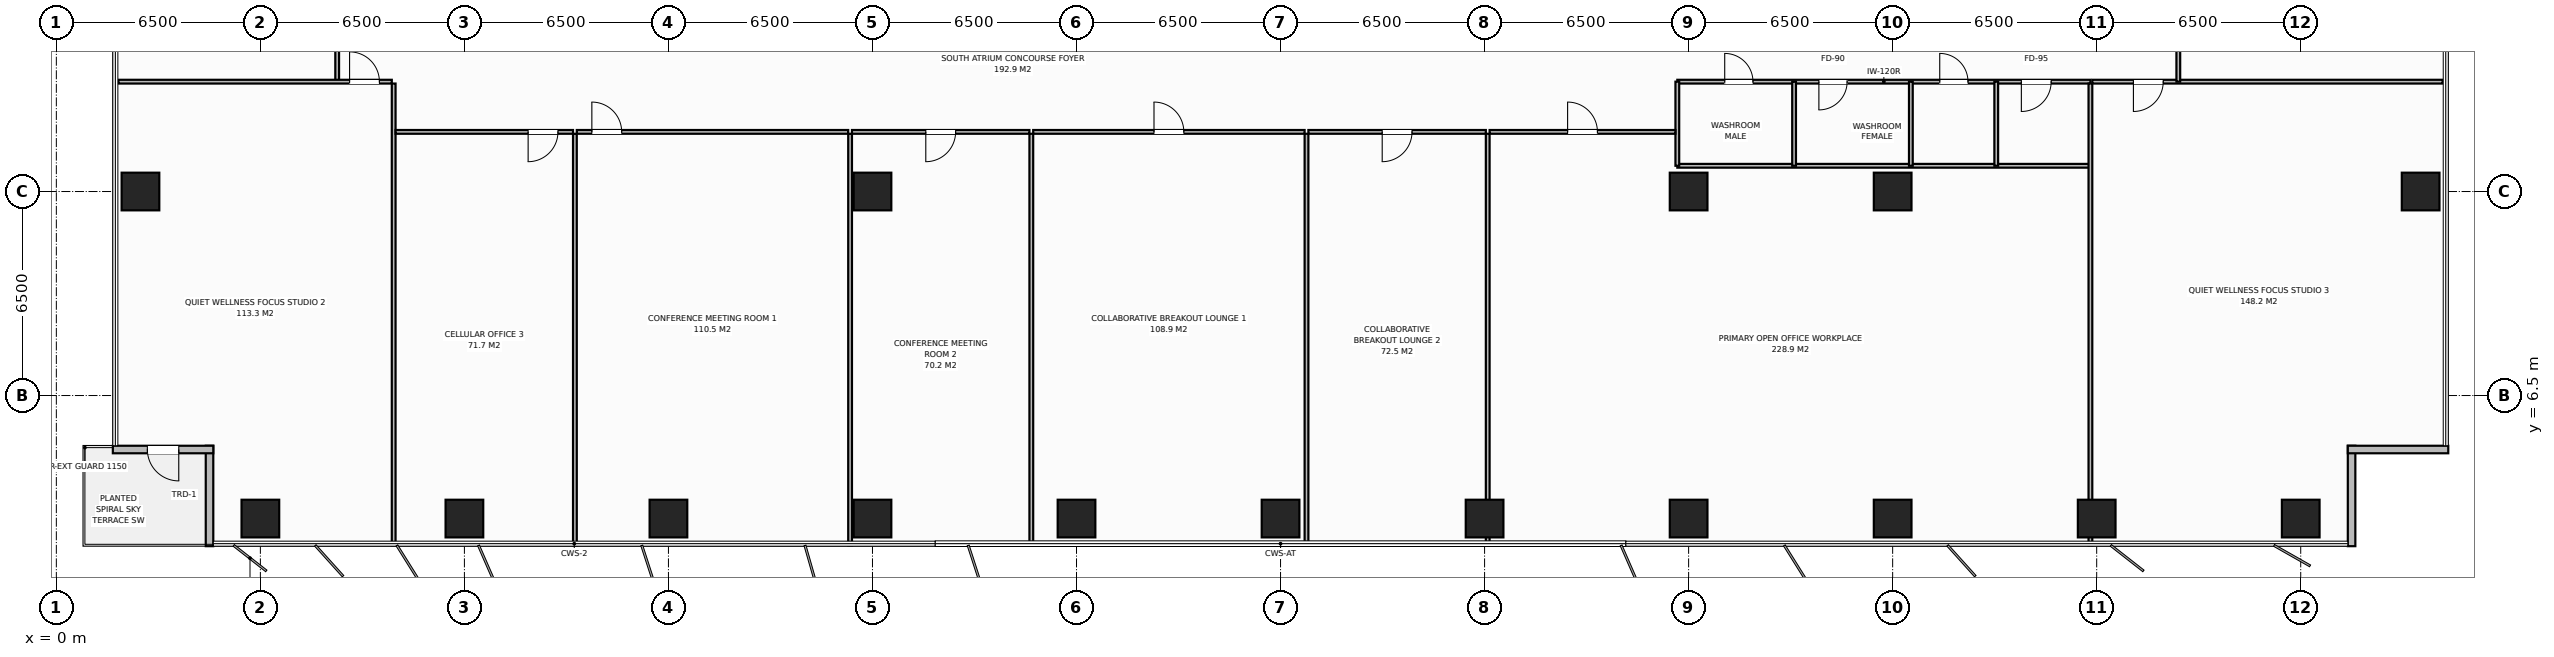
"""IFC4 building model, lengths in metres.
Left out: names, types, materials, properties, quantities, classifications, styles, units other than length and angle.
Written with IfcOpenShell. Run it as: python <this file> out.ifc"""

import sys

from ifc_helpers import new_model, si_unit, direction, frame, frame_2d, origin, origin_2d, place, context, subcontext, project, spatial, rectangle, extrude, element, fill, save


model = new_model("IFC4")
c1 = context("Model", 3, precision=1e-05, world=origin(), true_north=direction((0.0, 1.0)))
c2 = subcontext(c1, "Body", "Model", "MODEL_VIEW")
j1 = project(units=[si_unit("LENGTHUNIT", "METRE"), si_unit("PLANEANGLEUNIT", "RADIAN")], contexts=[c1])
p1 = place(None, origin())
s1 = spatial("IfcSite", under=j1, at=p1, CompositionType="ELEMENT")
p2 = place(p1, origin())
s2 = spatial("IfcBuilding", under=s1, at=p2, CompositionType="ELEMENT")
p3 = place(p2, frame((0.0, 0.0, 97.4)))
s3 = spatial("IfcBuildingStorey", under=s2, at=p3, CompositionType="ELEMENT", Elevation=97.4)
for number, where, z_axis, x_axis in (
    (1, (58.5, 13.0, 0.0), (0.0, 0.0, 1.0), (1.0, 0.0, 0.0)),
    (2, (26.0, 13.0, 0.0), (0.0, 0.0, 1.0), (1.0, 0.0, 0.0)),
    (3, (52.0, 13.0, 0.0), (0.0, 0.0, 1.0), (1.0, 0.0, 0.0)),
    (4, (6.5, 2.58, 0.0), (0.0, 0.0, 1.0), (1.0, 0.0, 0.0)),
    (5, (13.0, 2.58, 0.0), (0.0, 0.0, 1.0), (1.0, 0.0, 0.0)),
    (6, (19.5, 2.58, 0.0), (0.0, 0.0, 1.0), (1.0, 0.0, 0.0)),
    (7, (26.0, 2.58, 0.0), (0.0, 0.0, 1.0), (1.0, 0.0, 0.0)),
    (8, (32.5, 2.58, 0.0), (0.0, 0.0, 1.0), (1.0, 0.0, 0.0)),
    (9, (39.0, 2.58, 0.0), (0.0, 0.0, 1.0), (1.0, 0.0, 0.0)),
    (10, (45.5, 2.58, 0.0), (0.0, 0.0, 1.0), (1.0, 0.0, 0.0)),
    (11, (52.0, 2.58, 0.0), (0.0, 0.0, 1.0), (1.0, 0.0, 0.0)),
    (12, (58.5, 2.58, 0.0), (0.0, 0.0, 1.0), (1.0, 0.0, 0.0)),
    (13, (65.0, 2.58, 0.0), (0.0, 0.0, 1.0), (1.0, 0.0, 0.0)),
    (14, (71.5, 2.58, 0.0), (0.0, 0.0, 1.0), (1.0, 0.0, 0.0)),
    (15, (2.68, 13.0, 0.0), (0.0, 0.0, 1.0), (1.0, 0.0, 0.0)),
    (16, (75.32, 13.0, 0.0), (0.0, 0.0, 1.0), (1.0, 0.0, 0.0)),
):
    element("IfcColumn", number, at=place(p3, frame(where, z_axis=z_axis, x_axis=x_axis)), inside=s3, PredefinedType="COLUMN", context=c2, shape_type="SweptSolid", body=[
        extrude(rectangle(XDim=1.2, YDim=1.2, at=origin_2d()), origin(), (0.0, 0.0, 1.0), 3.8),
    ])
p4 = place(p3, frame((4.88, 1.7, 0.0), z_axis=(0.0, 0.0, 1.0), x_axis=(0.0, 1.0, 0.0)))
e17 = element("IfcWall", 17, at=p4, inside=s3, PredefinedType="STANDARD", context=c2, shape_type="SweptSolid", body=[
    extrude(rectangle(XDim=3.2, YDim=0.24, at=frame_2d((1.6, 0.0))), origin(), (0.0, 0.0, 1.0), 3.565),
])
p5 = place(p3, frame((5.0, 4.78, 0.0), z_axis=(0.0, 0.0, 1.0), x_axis=(-1.0, 0.0, 0.0)))
e18 = element("IfcWall", 18, at=p5, inside=s3, PredefinedType="STANDARD", context=c2, shape_type="SweptSolid", body=[
    extrude(rectangle(XDim=3.2, YDim=0.24, at=frame_2d((1.6, 0.0))), origin(), (0.0, 0.0, 1.0), 3.565),
])
p6 = place(p5, frame((1.1, 0.0, 0.0)))
e19 = element("IfcOpeningElement", 19, at=p6, cuts=e18, PredefinedType="OPENING", context=c2, shape_type="SweptSolid", body=[
    extrude(rectangle(XDim=1.0, YDim=2.2, at=frame_2d((0.5, 1.1))), frame((0.0, 0.13, 0.0), z_axis=(0.0, -1.0, 0.0), x_axis=(1.0, 0.0, 0.0)), (0.0, 0.0, 1.0), 0.26),
])
for number, where, z_axis, x_axis in (
    (20, (73.12, 4.9, 0.0), (0.0, 0.0, 1.0), (0.0, -1.0, 0.0)),
    (21, (76.2, 4.78, 0.0), (0.0, 0.0, 1.0), (-1.0, 0.0, 0.0)),
):
    element("IfcWall", number, at=place(p3, frame(where, z_axis=z_axis, x_axis=x_axis)), inside=s3, PredefinedType="STANDARD", context=c2, shape_type="SweptSolid", body=[
        extrude(rectangle(XDim=3.2, YDim=0.24, at=frame_2d((1.6, 0.0))), origin(), (0.0, 0.0, 1.0), 3.565),
    ])
p7 = place(p3, frame((8.947, 16.5, 0.0), z_axis=(0.0, 0.0, 1.0), x_axis=(0.0, 1.0, 0.0)))
e22 = element("IfcWall", 22, at=p7, inside=s3, PredefinedType="PARTITIONING", context=c2, shape_type="SweptSolid", body=[
    extrude(rectangle(XDim=2.1, YDim=0.12, at=frame_2d((1.05, 0.0))), origin(), (0.0, 0.0, 1.0), 3.565),
])
p8 = place(p3, frame((51.64, 16.5, 0.0), z_axis=(0.0, 0.0, 1.0), x_axis=(1.0, 0.0, 0.0)))
e23 = element("IfcWall", 23, at=p8, inside=s3, PredefinedType="PARTITIONING", context=c2, shape_type="SweptSolid", body=[
    extrude(rectangle(XDim=13.16, YDim=0.12, at=frame_2d((6.58, 0.0))), origin(), (0.0, 0.0, 1.0), 3.565),
])
p9 = place(p8, frame((1.51, 0.0, 0.0)))
e24 = element("IfcOpeningElement", 24, at=p9, cuts=e23, PredefinedType="OPENING", context=c2, shape_type="SweptSolid", body=[
    extrude(rectangle(XDim=0.9, YDim=2.15, at=frame_2d((0.45, 1.075))), frame((0.0, 0.07, 0.0), z_axis=(0.0, -1.0, 0.0), x_axis=(1.0, 0.0, 0.0)), (0.0, 0.0, 1.0), 0.14),
])
p10 = place(p8, frame((4.51, 0.0, 0.0)))
e25 = element("IfcOpeningElement", 25, at=p10, cuts=e23, PredefinedType="OPENING", context=c2, shape_type="SweptSolid", body=[
    extrude(rectangle(XDim=0.9, YDim=2.15, at=frame_2d((0.45, 1.075))), frame((0.0, 0.07, 0.0), z_axis=(0.0, -1.0, 0.0), x_axis=(1.0, 0.0, 0.0)), (0.0, 0.0, 1.0), 0.14),
])
p11 = place(p8, frame((8.36, 0.0, 0.0)))
e26 = element("IfcOpeningElement", 26, at=p11, cuts=e23, PredefinedType="OPENING", context=c2, shape_type="SweptSolid", body=[
    extrude(rectangle(XDim=0.9, YDim=2.15, at=frame_2d((0.45, 1.075))), frame((0.0, 0.07, 0.0), z_axis=(0.0, -1.0, 0.0), x_axis=(1.0, 0.0, 0.0)), (0.0, 0.0, 1.0), 0.14),
])
p12 = place(p8, frame((10.96, 0.0, 0.0)))
e27 = element("IfcOpeningElement", 27, at=p12, cuts=e23, PredefinedType="OPENING", context=c2, shape_type="SweptSolid", body=[
    extrude(rectangle(XDim=0.95, YDim=2.15, at=frame_2d((0.475, 1.075))), frame((0.0, 0.07, 0.0), z_axis=(0.0, -1.0, 0.0), x_axis=(1.0, 0.0, 0.0)), (0.0, 0.0, 1.0), 0.14),
])
p13 = place(p3, frame((51.64, 13.82, 0.0), z_axis=(0.0, 0.0, 1.0), x_axis=(1.0, 0.0, 0.0)))
e28 = element("IfcWall", 28, at=p13, inside=s3, PredefinedType="PARTITIONING", context=c2, shape_type="SweptSolid", body=[
    extrude(rectangle(XDim=13.16, YDim=0.12, at=frame_2d((6.58, 0.0))), origin(), (0.0, 0.0, 1.0), 3.565),
])
for number, where, z_axis, x_axis in (
    (29, (51.64, 13.82, 0.0), (0.0, 0.0, 1.0), (0.0, 1.0, 0.0)),
    (30, (55.36, 13.82, 0.0), (0.0, 0.0, 1.0), (0.0, 1.0, 0.0)),
    (31, (59.08, 13.82, 0.0), (0.0, 0.0, 1.0), (0.0, 1.0, 0.0)),
    (32, (61.8, 13.82, 0.0), (0.0, 0.0, 1.0), (0.0, 1.0, 0.0)),
):
    element("IfcWall", number, at=place(p3, frame(where, z_axis=z_axis, x_axis=x_axis)), inside=s3, PredefinedType="PARTITIONING", context=c2, shape_type="SweptSolid", body=[
        extrude(rectangle(XDim=2.68, YDim=0.12, at=frame_2d((1.34, 0.0))), origin(), (0.0, 0.0, 1.0), 3.565),
    ])
p14 = place(p3, frame((10.747, 1.72, 0.0), z_axis=(0.0, 0.0, 1.0), x_axis=(0.0, 1.0, 0.0)))
e33 = element("IfcWall", 33, at=p14, inside=s3, PredefinedType="PARTITIONING", context=c2, shape_type="SweptSolid", body=[
    extrude(rectangle(XDim=14.72, YDim=0.12, at=frame_2d((7.36, 0.0))), origin(), (0.0, 0.0, 1.0), 3.565),
])
p15 = place(p3, frame((1.98, 16.5, 0.0), z_axis=(0.0, 0.0, 1.0), x_axis=(1.0, 0.0, 0.0)))
e34 = element("IfcWall", 34, at=p15, inside=s3, PredefinedType="PARTITIONING", context=c2, shape_type="SweptSolid", body=[
    extrude(rectangle(XDim=8.707, YDim=0.12, at=frame_2d((4.354, 0.0))), origin(), (0.0, 0.0, 1.0), 3.565),
])
p16 = place(p15, frame((7.362, 0.0, 0.0)))
e35 = element("IfcOpeningElement", 35, at=p16, cuts=e34, PredefinedType="OPENING", context=c2, shape_type="SweptSolid", body=[
    extrude(rectangle(XDim=0.95, YDim=2.15, at=frame_2d((0.475, 1.075))), frame((0.0, 0.07, 0.0), z_axis=(0.0, -1.0, 0.0), x_axis=(1.0, 0.0, 0.0)), (0.0, 0.0, 1.0), 0.14),
])
p17 = place(p3, frame((16.52, 1.72, 0.0), z_axis=(0.0, 0.0, 1.0), x_axis=(0.0, 1.0, 0.0)))
e36 = element("IfcWall", 36, at=p17, inside=s3, PredefinedType="PARTITIONING", context=c2, shape_type="SweptSolid", body=[
    extrude(rectangle(XDim=13.12, YDim=0.12, at=frame_2d((6.56, 0.0))), origin(), (0.0, 0.0, 1.0), 3.565),
])
p18 = place(p3, frame((10.807, 14.9, 0.0), z_axis=(0.0, 0.0, 1.0), x_axis=(1.0, 0.0, 0.0)))
e37 = element("IfcWall", 37, at=p18, inside=s3, PredefinedType="PARTITIONING", context=c2, shape_type="SweptSolid", body=[
    extrude(rectangle(XDim=5.653, YDim=0.12, at=frame_2d((2.827, 0.0))), origin(), (0.0, 0.0, 1.0), 3.565),
])
p19 = place(p18, frame((4.223, 0.0, 0.0)))
e38 = element("IfcOpeningElement", 38, at=p19, cuts=e37, PredefinedType="OPENING", context=c2, shape_type="SweptSolid", body=[
    extrude(rectangle(XDim=0.95, YDim=2.15, at=frame_2d((0.475, 1.075))), frame((0.0, 0.07, 0.0), z_axis=(0.0, -1.0, 0.0), x_axis=(1.0, 0.0, 0.0)), (0.0, 0.0, 1.0), 0.14),
])
p20 = place(p3, frame((25.287, 1.72, 0.0), z_axis=(0.0, 0.0, 1.0), x_axis=(0.0, 1.0, 0.0)))
e39 = element("IfcWall", 39, at=p20, inside=s3, PredefinedType="PARTITIONING", context=c2, shape_type="SweptSolid", body=[
    extrude(rectangle(XDim=13.12, YDim=0.12, at=frame_2d((6.56, 0.0))), origin(), (0.0, 0.0, 1.0), 3.565),
])
p21 = place(p3, frame((16.58, 14.9, 0.0), z_axis=(0.0, 0.0, 1.0), x_axis=(1.0, 0.0, 0.0)))
e40 = element("IfcWall", 40, at=p21, inside=s3, PredefinedType="PARTITIONING", context=c2, shape_type="SweptSolid", body=[
    extrude(rectangle(XDim=8.647, YDim=0.12, at=frame_2d((4.323, 0.0))), origin(), (0.0, 0.0, 1.0), 3.565),
])
p22 = place(p21, frame((0.48, 0.0, 0.0)))
e41 = element("IfcOpeningElement", 41, at=p22, cuts=e40, PredefinedType="OPENING", context=c2, shape_type="SweptSolid", body=[
    extrude(rectangle(XDim=0.95, YDim=2.15, at=frame_2d((0.475, 1.075))), frame((0.0, 0.07, 0.0), z_axis=(0.0, -1.0, 0.0), x_axis=(1.0, 0.0, 0.0)), (0.0, 0.0, 1.0), 0.14),
])
p23 = place(p3, frame((31.06, 1.72, 0.0), z_axis=(0.0, 0.0, 1.0), x_axis=(0.0, 1.0, 0.0)))
e42 = element("IfcWall", 42, at=p23, inside=s3, PredefinedType="PARTITIONING", context=c2, shape_type="SweptSolid", body=[
    extrude(rectangle(XDim=13.12, YDim=0.12, at=frame_2d((6.56, 0.0))), origin(), (0.0, 0.0, 1.0), 3.565),
])
p24 = place(p3, frame((25.347, 14.9, 0.0), z_axis=(0.0, 0.0, 1.0), x_axis=(1.0, 0.0, 0.0)))
e43 = element("IfcWall", 43, at=p24, inside=s3, PredefinedType="PARTITIONING", context=c2, shape_type="SweptSolid", body=[
    extrude(rectangle(XDim=5.653, YDim=0.12, at=frame_2d((2.827, 0.0))), origin(), (0.0, 0.0, 1.0), 3.565),
])
p25 = place(p24, frame((2.352, 0.0, 0.0)))
e44 = element("IfcOpeningElement", 44, at=p25, cuts=e43, PredefinedType="OPENING", context=c2, shape_type="SweptSolid", body=[
    extrude(rectangle(XDim=0.95, YDim=2.15, at=frame_2d((0.475, 1.075))), frame((0.0, 0.07, 0.0), z_axis=(0.0, -1.0, 0.0), x_axis=(1.0, 0.0, 0.0)), (0.0, 0.0, 1.0), 0.14),
])
p26 = place(p3, frame((39.827, 1.72, 0.0), z_axis=(0.0, 0.0, 1.0), x_axis=(0.0, 1.0, 0.0)))
e45 = element("IfcWall", 45, at=p26, inside=s3, PredefinedType="PARTITIONING", context=c2, shape_type="SweptSolid", body=[
    extrude(rectangle(XDim=13.12, YDim=0.12, at=frame_2d((6.56, 0.0))), origin(), (0.0, 0.0, 1.0), 3.565),
])
p27 = place(p3, frame((31.12, 14.9, 0.0), z_axis=(0.0, 0.0, 1.0), x_axis=(1.0, 0.0, 0.0)))
e46 = element("IfcWall", 46, at=p27, inside=s3, PredefinedType="PARTITIONING", context=c2, shape_type="SweptSolid", body=[
    extrude(rectangle(XDim=8.647, YDim=0.12, at=frame_2d((4.323, 0.0))), origin(), (0.0, 0.0, 1.0), 3.565),
])
p28 = place(p27, frame((3.848, 0.0, 0.0)))
e47 = element("IfcOpeningElement", 47, at=p28, cuts=e46, PredefinedType="OPENING", context=c2, shape_type="SweptSolid", body=[
    extrude(rectangle(XDim=0.95, YDim=2.15, at=frame_2d((0.475, 1.075))), frame((0.0, 0.07, 0.0), z_axis=(0.0, -1.0, 0.0), x_axis=(1.0, 0.0, 0.0)), (0.0, 0.0, 1.0), 0.14),
])
p29 = place(p3, frame((45.6, 1.72, 0.0), z_axis=(0.0, 0.0, 1.0), x_axis=(0.0, 1.0, 0.0)))
e48 = element("IfcWall", 48, at=p29, inside=s3, PredefinedType="PARTITIONING", context=c2, shape_type="SweptSolid", body=[
    extrude(rectangle(XDim=13.12, YDim=0.12, at=frame_2d((6.56, 0.0))), origin(), (0.0, 0.0, 1.0), 2.965),
])
p30 = place(p3, frame((39.887, 14.9, 0.0), z_axis=(0.0, 0.0, 1.0), x_axis=(1.0, 0.0, 0.0)))
e49 = element("IfcWall", 49, at=p30, inside=s3, PredefinedType="PARTITIONING", context=c2, shape_type="SweptSolid", body=[
    extrude(rectangle(XDim=5.653, YDim=0.12, at=frame_2d((2.827, 0.0))), origin(), (0.0, 0.0, 1.0), 3.565),
])
p31 = place(p30, frame((2.352, 0.0, 0.0)))
e50 = element("IfcOpeningElement", 50, at=p31, cuts=e49, PredefinedType="OPENING", context=c2, shape_type="SweptSolid", body=[
    extrude(rectangle(XDim=0.95, YDim=2.15, at=frame_2d((0.475, 1.075))), frame((0.0, 0.07, 0.0), z_axis=(0.0, -1.0, 0.0), x_axis=(1.0, 0.0, 0.0)), (0.0, 0.0, 1.0), 0.14),
])
p32 = place(p3, frame((64.8, 1.72, 0.0), z_axis=(0.0, 0.0, 1.0), x_axis=(0.0, 1.0, 0.0)))
e51 = element("IfcWall", 51, at=p32, inside=s3, PredefinedType="PARTITIONING", context=c2, shape_type="SweptSolid", body=[
    extrude(rectangle(XDim=14.72, YDim=0.12, at=frame_2d((7.36, 0.0))), origin(), (0.0, 0.0, 1.0), 2.965),
])
p33 = place(p3, frame((45.66, 14.9, 0.0), z_axis=(0.0, 0.0, 1.0), x_axis=(1.0, 0.0, 0.0)))
e52 = element("IfcWall", 52, at=p33, inside=s3, PredefinedType="PARTITIONING", context=c2, shape_type="SweptSolid", body=[
    extrude(rectangle(XDim=5.92, YDim=0.12, at=frame_2d((2.96, 0.0))), origin(), (0.0, 0.0, 1.0), 3.565),
])
p34 = place(p33, frame((2.485, 0.0, 0.0)))
e53 = element("IfcOpeningElement", 53, at=p34, cuts=e52, PredefinedType="OPENING", context=c2, shape_type="SweptSolid", body=[
    extrude(rectangle(XDim=0.95, YDim=2.15, at=frame_2d((0.475, 1.075))), frame((0.0, 0.07, 0.0), z_axis=(0.0, -1.0, 0.0), x_axis=(1.0, 0.0, 0.0)), (0.0, 0.0, 1.0), 0.14),
])
p35 = place(p3, frame((64.86, 16.5, 0.0), z_axis=(0.0, 0.0, 1.0), x_axis=(1.0, 0.0, 0.0)))
e54 = element("IfcWall", 54, at=p35, inside=s3, PredefinedType="PARTITIONING", context=c2, shape_type="SweptSolid", body=[
    extrude(rectangle(XDim=11.16, YDim=0.12, at=frame_2d((5.58, 0.0))), origin(), (0.0, 0.0, 1.0), 3.565),
])
p36 = place(p35, frame((1.31, 0.0, 0.0)))
e55 = element("IfcOpeningElement", 55, at=p36, cuts=e54, PredefinedType="OPENING", context=c2, shape_type="SweptSolid", body=[
    extrude(rectangle(XDim=0.95, YDim=2.15, at=frame_2d((0.475, 1.075))), frame((0.0, 0.07, 0.0), z_axis=(0.0, -1.0, 0.0), x_axis=(1.0, 0.0, 0.0)), (0.0, 0.0, 1.0), 0.14),
])
p37 = place(p3, frame((67.6, 16.5, 0.0), z_axis=(0.0, 0.0, 1.0), x_axis=(0.0, 1.0, 0.0)))
e56 = element("IfcWall", 56, at=p37, inside=s3, PredefinedType="PARTITIONING", context=c2, shape_type="SweptSolid", body=[
    extrude(rectangle(XDim=9.5, YDim=0.12, at=frame_2d((4.75, 0.0))), origin(), (0.0, 0.0, 1.0), 3.565),
])
p38 = place(p37, frame((5.325, 0.0, 0.0)))
e57 = element("IfcOpeningElement", 57, at=p38, cuts=e56, PredefinedType="OPENING", context=c2, shape_type="SweptSolid", body=[
    extrude(rectangle(XDim=0.95, YDim=2.15, at=frame_2d((0.475, 1.075))), frame((0.0, 0.07, 0.0), z_axis=(0.0, -1.0, 0.0), x_axis=(1.0, 0.0, 0.0)), (0.0, 0.0, 1.0), 0.14),
])
p39 = place(p6, origin())
e58 = element("IfcDoor", 58, at=p39, inside=s3, OperationType="SINGLE_SWING_LEFT", PredefinedType="DOOR", context=c2, shape_type="SweptSolid", body=[
    extrude(rectangle(XDim=1.0, YDim=2.2, at=frame_2d((0.5, 1.1))), frame((0.0, 0.025, 0.0), z_axis=(0.0, -1.0, 0.0), x_axis=(1.0, 0.0, 0.0)), (0.0, 0.0, 1.0), 0.05),
])
fill(e19, e58)
p40 = place(p9, origin())
e59 = element("IfcDoor", 59, at=p40, inside=s3, OperationType="SINGLE_SWING_LEFT", PredefinedType="DOOR", context=c2, shape_type="SweptSolid", body=[
    extrude(rectangle(XDim=0.9, YDim=2.15, at=frame_2d((0.45, 1.075))), frame((0.0, 0.025, 0.0), z_axis=(0.0, -1.0, 0.0), x_axis=(1.0, 0.0, 0.0)), (0.0, 0.0, 1.0), 0.05),
])
fill(e24, e59)
p41 = place(p10, origin())
e60 = element("IfcDoor", 60, at=p41, inside=s3, OperationType="SINGLE_SWING_RIGHT", PredefinedType="DOOR", context=c2, shape_type="SweptSolid", body=[
    extrude(rectangle(XDim=0.9, YDim=2.15, at=frame_2d((0.45, 1.075))), frame((0.0, 0.025, 0.0), z_axis=(0.0, -1.0, 0.0), x_axis=(1.0, 0.0, 0.0)), (0.0, 0.0, 1.0), 0.05),
])
fill(e25, e60)
p42 = place(p11, origin())
e61 = element("IfcDoor", 61, at=p42, inside=s3, OperationType="SINGLE_SWING_LEFT", PredefinedType="DOOR", context=c2, shape_type="SweptSolid", body=[
    extrude(rectangle(XDim=0.9, YDim=2.15, at=frame_2d((0.45, 1.075))), frame((0.0, 0.025, 0.0), z_axis=(0.0, -1.0, 0.0), x_axis=(1.0, 0.0, 0.0)), (0.0, 0.0, 1.0), 0.05),
])
fill(e26, e61)
p43 = place(p12, origin())
e62 = element("IfcDoor", 62, at=p43, inside=s3, OperationType="SINGLE_SWING_RIGHT", PredefinedType="DOOR", context=c2, shape_type="SweptSolid", body=[
    extrude(rectangle(XDim=0.95, YDim=2.15, at=frame_2d((0.475, 1.075))), frame((0.0, 0.025, 0.0), z_axis=(0.0, -1.0, 0.0), x_axis=(1.0, 0.0, 0.0)), (0.0, 0.0, 1.0), 0.05),
])
fill(e27, e62)
p44 = place(p16, origin())
e63 = element("IfcDoor", 63, at=p44, inside=s3, OperationType="SINGLE_SWING_LEFT", PredefinedType="DOOR", context=c2, shape_type="SweptSolid", body=[
    extrude(rectangle(XDim=0.95, YDim=2.15, at=frame_2d((0.475, 1.075))), frame((0.0, 0.025, 0.0), z_axis=(0.0, -1.0, 0.0), x_axis=(1.0, 0.0, 0.0)), (0.0, 0.0, 1.0), 0.05),
])
fill(e35, e63)
p45 = place(p19, origin())
e64 = element("IfcDoor", 64, at=p45, inside=s3, OperationType="SINGLE_SWING_RIGHT", PredefinedType="DOOR", context=c2, shape_type="SweptSolid", body=[
    extrude(rectangle(XDim=0.95, YDim=2.15, at=frame_2d((0.475, 1.075))), frame((0.0, 0.025, 0.0), z_axis=(0.0, -1.0, 0.0), x_axis=(1.0, 0.0, 0.0)), (0.0, 0.0, 1.0), 0.05),
])
fill(e38, e64)
p46 = place(p22, origin())
e65 = element("IfcDoor", 65, at=p46, inside=s3, OperationType="SINGLE_SWING_LEFT", PredefinedType="DOOR", context=c2, shape_type="SweptSolid", body=[
    extrude(rectangle(XDim=0.95, YDim=2.15, at=frame_2d((0.475, 1.075))), frame((0.0, 0.025, 0.0), z_axis=(0.0, -1.0, 0.0), x_axis=(1.0, 0.0, 0.0)), (0.0, 0.0, 1.0), 0.05),
])
fill(e41, e65)
p47 = place(p25, origin())
e66 = element("IfcDoor", 66, at=p47, inside=s3, OperationType="SINGLE_SWING_RIGHT", PredefinedType="DOOR", context=c2, shape_type="SweptSolid", body=[
    extrude(rectangle(XDim=0.95, YDim=2.15, at=frame_2d((0.475, 1.075))), frame((0.0, 0.025, 0.0), z_axis=(0.0, -1.0, 0.0), x_axis=(1.0, 0.0, 0.0)), (0.0, 0.0, 1.0), 0.05),
])
fill(e44, e66)
p48 = place(p28, origin())
e67 = element("IfcDoor", 67, at=p48, inside=s3, OperationType="SINGLE_SWING_LEFT", PredefinedType="DOOR", context=c2, shape_type="SweptSolid", body=[
    extrude(rectangle(XDim=0.95, YDim=2.15, at=frame_2d((0.475, 1.075))), frame((0.0, 0.025, 0.0), z_axis=(0.0, -1.0, 0.0), x_axis=(1.0, 0.0, 0.0)), (0.0, 0.0, 1.0), 0.05),
])
fill(e47, e67)
p49 = place(p31, origin())
e68 = element("IfcDoor", 68, at=p49, inside=s3, OperationType="SINGLE_SWING_RIGHT", PredefinedType="DOOR", context=c2, shape_type="SweptSolid", body=[
    extrude(rectangle(XDim=0.95, YDim=2.15, at=frame_2d((0.475, 1.075))), frame((0.0, 0.025, 0.0), z_axis=(0.0, -1.0, 0.0), x_axis=(1.0, 0.0, 0.0)), (0.0, 0.0, 1.0), 0.05),
])
fill(e50, e68)
p50 = place(p34, origin())
e69 = element("IfcDoor", 69, at=p50, inside=s3, OperationType="SINGLE_SWING_LEFT", PredefinedType="DOOR", context=c2, shape_type="SweptSolid", body=[
    extrude(rectangle(XDim=0.95, YDim=2.15, at=frame_2d((0.475, 1.075))), frame((0.0, 0.025, 0.0), z_axis=(0.0, -1.0, 0.0), x_axis=(1.0, 0.0, 0.0)), (0.0, 0.0, 1.0), 0.05),
])
fill(e53, e69)
p51 = place(p36, origin())
e70 = element("IfcDoor", 70, at=p51, inside=s3, OperationType="SINGLE_SWING_RIGHT", PredefinedType="DOOR", context=c2, shape_type="SweptSolid", body=[
    extrude(rectangle(XDim=0.95, YDim=2.15, at=frame_2d((0.475, 1.075))), frame((0.0, 0.025, 0.0), z_axis=(0.0, -1.0, 0.0), x_axis=(1.0, 0.0, 0.0)), (0.0, 0.0, 1.0), 0.05),
])
fill(e55, e70)
save(model, sys.argv[1])
